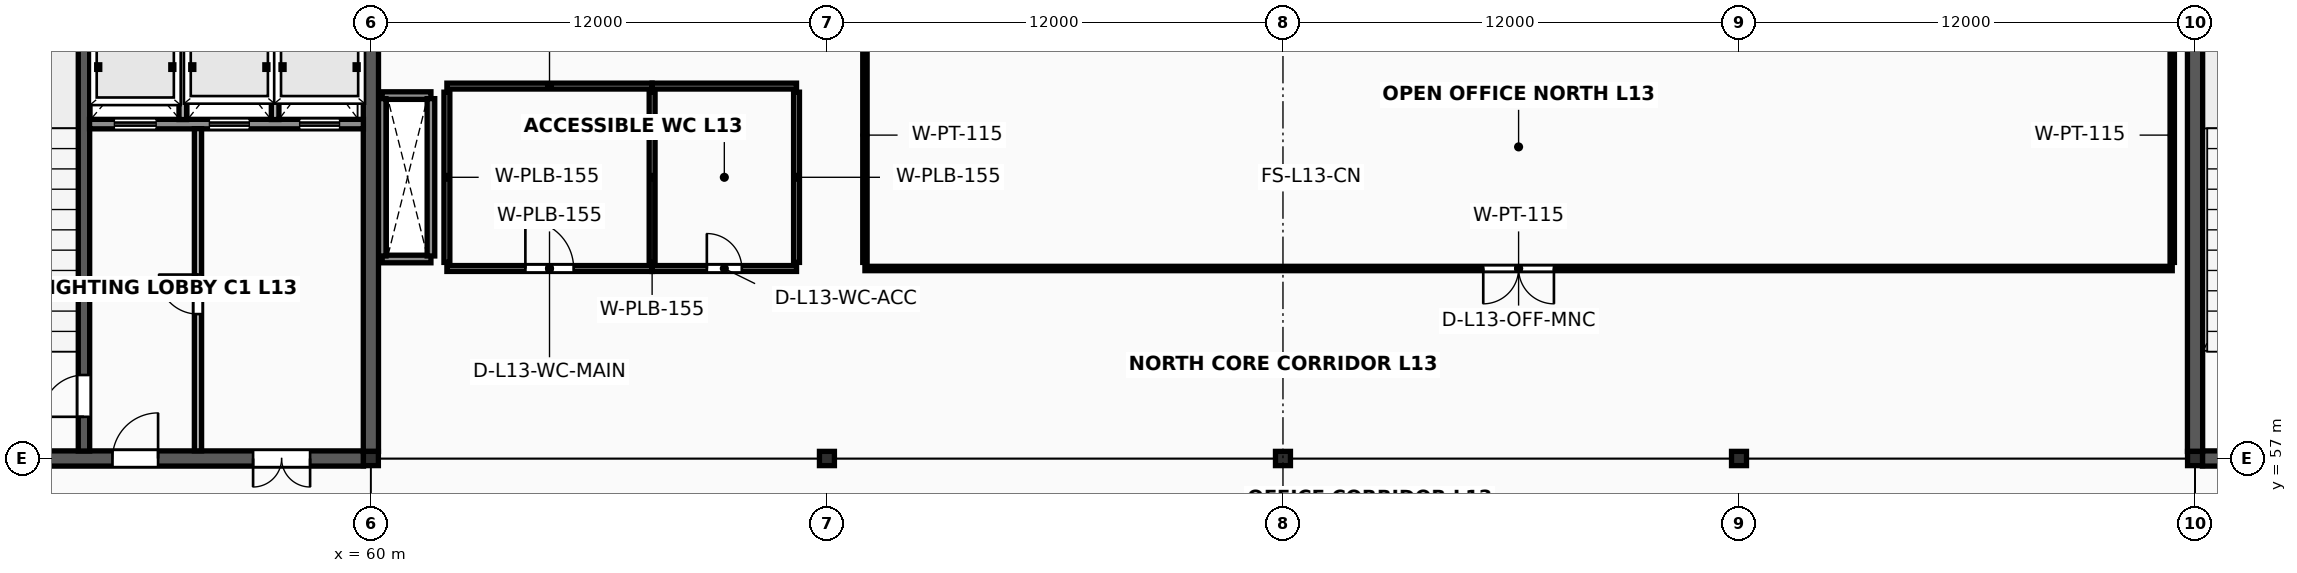
"""IFC4 building model, lengths in metres.
Left out: names, types, materials, properties, quantities, classifications, styles, units other than length and angle.
Written with IfcOpenShell. Run it as: python <this file> out.ifc"""

import sys

from ifc_helpers import new_model, si_unit, direction, frame, frame_2d, origin, origin_2d, place, context, subcontext, project, spatial, rectangle, i_section, extrude, element, fill, save


model = new_model("IFC4")
c1 = context("Model", 3, precision=1e-05, world=origin(), true_north=direction((0.0, 1.0)))
c2 = subcontext(c1, "Body", "Model", "MODEL_VIEW")
j1 = project(units=[si_unit("LENGTHUNIT", "METRE"), si_unit("PLANEANGLEUNIT", "RADIAN")], contexts=[c1])
p1 = place(None, origin())
s1 = spatial("IfcSite", under=j1, at=p1, CompositionType="ELEMENT")
p2 = place(p1, origin())
s2 = spatial("IfcBuilding", under=s1, at=p2, CompositionType="ELEMENT")
p3 = place(p2, frame((0.0, 0.0, 53.6)))
s3 = spatial("IfcBuildingStorey", under=s2, at=p3, CompositionType="ELEMENT", Elevation=53.6)
for number, where, z_axis, x_axis in (
    (1, (60.0, 57.0, 0.0), (0.0, 0.0, 1.0), (1.0, 0.0, 0.0)),
    (2, (72.0, 57.0, 0.0), (0.0, 0.0, 1.0), (1.0, 0.0, 0.0)),
    (3, (84.0, 57.0, 0.0), (0.0, 0.0, 1.0), (1.0, 0.0, 0.0)),
    (4, (96.0, 57.0, 0.0), (0.0, 0.0, 1.0), (1.0, 0.0, 0.0)),
    (5, (108.0, 57.0, 0.0), (0.0, 0.0, 1.0), (1.0, 0.0, 0.0)),
):
    element("IfcColumn", number, at=place(p3, frame(where, z_axis=z_axis, x_axis=x_axis)), inside=s3, PredefinedType="COLUMN", context=c2, shape_type="SweptSolid", body=[
        extrude(i_section(OverallWidth=0.394, OverallDepth=0.375, WebThickness=0.017, FlangeThickness=0.028, FilletRadius=0.018, at=origin_2d()), origin(), (0.0, 0.0, 1.0), 4.0),
    ])
for number, where, z_axis, x_axis in (
    (6, (60.297, 62.25, 0.0), (0.0, 0.0, 1.0), (1.0, 0.0, 0.0)),
    (7, (60.297, 66.55, 0.0), (0.0, 0.0, 1.0), (1.0, 0.0, 0.0)),
):
    element("IfcWall", number, at=place(p3, frame(where, z_axis=z_axis, x_axis=x_axis)), inside=s3, PredefinedType="SOLIDWALL", context=c2, shape_type="SweptSolid", body=[
        extrude(rectangle(XDim=1.283, YDim=0.2, at=frame_2d((0.642, 0.0))), origin(), (0.0, 0.0, 1.0), 3.818),
    ])
for number, where, z_axis, x_axis in (
    (8, (60.297, 62.33, 0.0), (0.0, 0.0, 1.0), (0.0, 1.0, 0.0)),
    (9, (61.58, 62.33, 0.0), (0.0, 0.0, 1.0), (0.0, 1.0, 0.0)),
):
    element("IfcWall", number, at=place(p3, frame(where, z_axis=z_axis, x_axis=x_axis)), inside=s3, PredefinedType="SOLIDWALL", context=c2, shape_type="SweptSolid", body=[
        extrude(rectangle(XDim=4.14, YDim=0.2, at=frame_2d((2.07, 0.0))), origin(), (0.0, 0.0, 1.0), 3.818),
    ])
p4 = place(p3, frame((48.194, 57.0, 0.0), z_axis=(0.0, 0.0, 1.0), x_axis=(1.0, 0.0, 0.0)))
e10 = element("IfcWall", 10, at=p4, inside=s3, PredefinedType="SHEAR", context=c2, shape_type="SweptSolid", body=[
    extrude(rectangle(XDim=11.612, YDim=0.4, at=frame_2d((5.806, 0.0))), origin(), (0.0, 0.0, 1.0), 3.818),
])
p5 = place(p4, frame((5.006, 0.0, 0.0)))
e11 = element("IfcOpeningElement", 11, at=p5, cuts=e10, PredefinedType="OPENING", context=c2, shape_type="SweptSolid", body=[
    extrude(rectangle(XDim=1.2, YDim=2.2, at=frame_2d((0.6, 1.1))), frame((0.0, 0.215, 0.0), z_axis=(0.0, -1.0, 0.0), x_axis=(1.0, 0.0, 0.0)), (0.0, 0.0, 1.0), 0.43),
])
p6 = place(p4, frame((8.706, 0.0, 0.0)))
e12 = element("IfcOpeningElement", 12, at=p6, cuts=e10, PredefinedType="OPENING", context=c2, shape_type="SweptSolid", body=[
    extrude(rectangle(XDim=1.5, YDim=2.25, at=frame_2d((0.75, 1.125))), frame((0.0, 0.215, 0.0), z_axis=(0.0, -1.0, 0.0), x_axis=(1.0, 0.0, 0.0)), (0.0, 0.0, 1.0), 0.43),
])
p7 = place(p3, frame((60.0, 57.185, 0.0), z_axis=(0.0, 0.0, 1.0), x_axis=(0.0, 1.0, 0.0)))
e13 = element("IfcWall", 13, at=p7, inside=s3, PredefinedType="SHEAR", context=c2, shape_type="SweptSolid", body=[
    extrude(rectangle(XDim=11.64, YDim=0.4, at=frame_2d((5.82, 0.0))), origin(), (0.0, 0.0, 1.0), 3.818),
])
p8 = place(p3, frame((52.45, 57.197, 0.0), z_axis=(0.0, 0.0, 1.0), x_axis=(0.0, 1.0, 0.0)))
e14 = element("IfcWall", 14, at=p8, inside=s3, PredefinedType="SHEAR", context=c2, shape_type="SweptSolid", body=[
    extrude(rectangle(XDim=11.606, YDim=0.3, at=frame_2d((5.803, 0.0))), origin(), (0.0, 0.0, 1.0), 3.818),
])
p9 = place(p8, frame((0.9, 0.0, 0.0)))
e15 = element("IfcOpeningElement", 15, at=p9, cuts=e14, PredefinedType="OPENING", context=c2, shape_type="SweptSolid", body=[
    extrude(rectangle(XDim=1.1, YDim=2.2, at=frame_2d((0.55, 1.1))), frame((0.0, 0.165, 0.0), z_axis=(0.0, -1.0, 0.0), x_axis=(1.0, 0.0, 0.0)), (0.0, 0.0, 1.0), 0.33),
])
p10 = place(p3, frame((52.597, 65.8, 0.0), z_axis=(0.0, 0.0, 1.0), x_axis=(1.0, 0.0, 0.0)))
e16 = element("IfcWall", 16, at=p10, inside=s3, PredefinedType="SOLIDWALL", context=c2, shape_type="SweptSolid", body=[
    extrude(rectangle(XDim=7.206, YDim=0.25, at=frame_2d((3.603, 0.0))), origin(), (0.0, 0.0, 1.0), 3.818),
])
p11 = place(p10, frame((0.653, 0.0, 0.0)))
e17 = element("IfcOpeningElement", 17, at=p11, cuts=e16, PredefinedType="OPENING", context=c2, shape_type="SweptSolid", body=[
    extrude(rectangle(XDim=1.1, YDim=2.24, at=frame_2d((0.55, 1.12))), frame((0.0, 0.14, 0.0), z_axis=(0.0, -1.0, 0.0), x_axis=(1.0, 0.0, 0.0)), (0.0, 0.0, 1.0), 0.28),
])
p12 = place(p10, frame((3.153, 0.0, 0.0)))
e18 = element("IfcOpeningElement", 18, at=p12, cuts=e16, PredefinedType="OPENING", context=c2, shape_type="SweptSolid", body=[
    extrude(rectangle(XDim=1.05, YDim=2.2, at=frame_2d((0.525, 1.1))), frame((0.0, 0.14, 0.0), z_axis=(0.0, -1.0, 0.0), x_axis=(1.0, 0.0, 0.0)), (0.0, 0.0, 1.0), 0.28),
])
p13 = place(p10, frame((5.528, 0.0, 0.0)))
e19 = element("IfcOpeningElement", 19, at=p13, cuts=e16, PredefinedType="OPENING", context=c2, shape_type="SweptSolid", body=[
    extrude(rectangle(XDim=1.05, YDim=2.2, at=frame_2d((0.525, 1.1))), frame((0.0, 0.14, 0.0), z_axis=(0.0, -1.0, 0.0), x_axis=(1.0, 0.0, 0.0)), (0.0, 0.0, 1.0), 0.28),
])
for number, where, z_axis, x_axis in (
    (20, (55.05, 65.92, 0.0), (0.0, 0.0, 1.0), (0.0, 1.0, 0.0)),
    (21, (57.48, 65.92, 0.0), (0.0, 0.0, 1.0), (0.0, 1.0, 0.0)),
):
    element("IfcWall", number, at=place(p3, frame(where, z_axis=z_axis, x_axis=x_axis)), inside=s3, PredefinedType="SOLIDWALL", context=c2, shape_type="SweptSolid", body=[
        extrude(rectangle(XDim=2.88, YDim=0.2, at=frame_2d((1.44, 0.0))), origin(), (0.0, 0.0, 1.0), 3.808),
    ])
p14 = place(p3, frame((55.45, 57.2, 0.0), z_axis=(0.0, 0.0, 1.0), x_axis=(0.0, 1.0, 0.0)))
e22 = element("IfcWall", 22, at=p14, inside=s3, PredefinedType="SOLIDWALL", context=c2, shape_type="SweptSolid", body=[
    extrude(rectangle(XDim=8.48, YDim=0.19, at=frame_2d((4.24, 0.0))), origin(), (0.0, 0.0, 1.0), 3.808),
])
p15 = place(p14, frame((3.6, 0.0, 0.0)))
e23 = element("IfcOpeningElement", 23, at=p15, cuts=e22, PredefinedType="OPENING", context=c2, shape_type="SweptSolid", body=[
    extrude(rectangle(XDim=1.04, YDim=2.18, at=frame_2d((0.52, 1.09))), frame((0.0, 0.11, 0.0), z_axis=(0.0, -1.0, 0.0), x_axis=(1.0, 0.0, 0.0)), (0.0, 0.0, 1.0), 0.22),
])
p16 = place(p3, frame((108.194, 57.0, 0.0), z_axis=(0.0, 0.0, 1.0), x_axis=(1.0, 0.0, 0.0)))
e24 = element("IfcWall", 24, at=p16, inside=s3, PredefinedType="SHEAR", context=c2, shape_type="SweptSolid", body=[
    extrude(rectangle(XDim=11.612, YDim=0.4, at=frame_2d((5.806, 0.0))), origin(), (0.0, 0.0, 1.0), 3.818),
])
p17 = place(p16, frame((5.006, 0.0, 0.0)))
e25 = element("IfcOpeningElement", 25, at=p17, cuts=e24, PredefinedType="OPENING", context=c2, shape_type="SweptSolid", body=[
    extrude(rectangle(XDim=1.2, YDim=2.2, at=frame_2d((0.6, 1.1))), frame((0.0, 0.215, 0.0), z_axis=(0.0, -1.0, 0.0), x_axis=(1.0, 0.0, 0.0)), (0.0, 0.0, 1.0), 0.43),
])
p18 = place(p16, frame((8.706, 0.0, 0.0)))
e26 = element("IfcOpeningElement", 26, at=p18, cuts=e24, PredefinedType="OPENING", context=c2, shape_type="SweptSolid", body=[
    extrude(rectangle(XDim=1.5, YDim=2.25, at=frame_2d((0.75, 1.125))), frame((0.0, 0.215, 0.0), z_axis=(0.0, -1.0, 0.0), x_axis=(1.0, 0.0, 0.0)), (0.0, 0.0, 1.0), 0.43),
])
p19 = place(p3, frame((108.0, 57.185, 0.0), z_axis=(0.0, 0.0, 1.0), x_axis=(0.0, 1.0, 0.0)))
e27 = element("IfcWall", 27, at=p19, inside=s3, PredefinedType="SHEAR", context=c2, shape_type="SweptSolid", body=[
    extrude(rectangle(XDim=11.64, YDim=0.4, at=frame_2d((5.82, 0.0))), origin(), (0.0, 0.0, 1.0), 3.818),
])
p20 = place(p3, frame((62.0, 62.0, 0.0), z_axis=(0.0, 0.0, 1.0), x_axis=(1.0, 0.0, 0.0)))
e28 = element("IfcWall", 28, at=p20, inside=s3, PredefinedType="PLUMBINGWALL", context=c2, shape_type="SweptSolid", body=[
    extrude(rectangle(XDim=5.4, YDim=0.155, at=frame_2d((2.7, 0.0))), origin(), (0.0, 0.0, 1.0), 2.88),
])
p21 = place(p20, frame((2.065, 0.0, 0.0)))
e29 = element("IfcOpeningElement", 29, at=p21, cuts=e28, PredefinedType="OPENING", context=c2, shape_type="SweptSolid", body=[
    extrude(rectangle(XDim=1.27, YDim=2.27, at=frame_2d((0.635, 1.135))), frame((0.0, 0.093, 0.0), z_axis=(0.0, -1.0, 0.0), x_axis=(1.0, 0.0, 0.0)), (0.0, 0.0, 1.0), 0.185),
])
p22 = place(p3, frame((62.0, 66.8, 0.0), z_axis=(0.0, 0.0, 1.0), x_axis=(1.0, 0.0, 0.0)))
e30 = element("IfcWall", 30, at=p22, inside=s3, PredefinedType="PLUMBINGWALL", context=c2, shape_type="SweptSolid", body=[
    extrude(rectangle(XDim=5.4, YDim=0.155, at=frame_2d((2.7, 0.0))), origin(), (0.0, 0.0, 1.0), 2.88),
])
for number, where, z_axis, x_axis in (
    (31, (62.0, 62.16, 0.0), (0.0, 0.0, 1.0), (0.0, 1.0, 0.0)),
    (32, (67.4, 62.16, 0.0), (0.0, 0.0, 1.0), (0.0, 1.0, 0.0)),
):
    element("IfcWall", number, at=place(p3, frame(where, z_axis=z_axis, x_axis=x_axis)), inside=s3, PredefinedType="PLUMBINGWALL", context=c2, shape_type="SweptSolid", body=[
        extrude(rectangle(XDim=4.48, YDim=0.155, at=frame_2d((2.24, 0.0))), origin(), (0.0, 0.0, 1.0), 2.88),
    ])
p23 = place(p3, frame((67.4, 62.0, 0.0), z_axis=(0.0, 0.0, 1.0), x_axis=(1.0, 0.0, 0.0)))
e33 = element("IfcWall", 33, at=p23, inside=s3, PredefinedType="PLUMBINGWALL", context=c2, shape_type="SweptSolid", body=[
    extrude(rectangle(XDim=3.8, YDim=0.155, at=frame_2d((1.9, 0.0))), origin(), (0.0, 0.0, 1.0), 2.88),
])
p24 = place(p23, frame((1.44, 0.0, 0.0)))
e34 = element("IfcOpeningElement", 34, at=p24, cuts=e33, PredefinedType="OPENING", context=c2, shape_type="SweptSolid", body=[
    extrude(rectangle(XDim=0.92, YDim=2.1, at=frame_2d((0.46, 1.05))), frame((0.0, 0.093, 0.0), z_axis=(0.0, -1.0, 0.0), x_axis=(1.0, 0.0, 0.0)), (0.0, 0.0, 1.0), 0.185),
])
p25 = place(p3, frame((67.4, 66.8, 0.0), z_axis=(0.0, 0.0, 1.0), x_axis=(1.0, 0.0, 0.0)))
e35 = element("IfcWall", 35, at=p25, inside=s3, PredefinedType="PLUMBINGWALL", context=c2, shape_type="SweptSolid", body=[
    extrude(rectangle(XDim=3.8, YDim=0.155, at=frame_2d((1.9, 0.0))), origin(), (0.0, 0.0, 1.0), 2.88),
])
p26 = place(p3, frame((71.2, 62.16, 0.0), z_axis=(0.0, 0.0, 1.0), x_axis=(0.0, 1.0, 0.0)))
e36 = element("IfcWall", 36, at=p26, inside=s3, PredefinedType="PLUMBINGWALL", context=c2, shape_type="SweptSolid", body=[
    extrude(rectangle(XDim=4.48, YDim=0.155, at=frame_2d((2.24, 0.0))), origin(), (0.0, 0.0, 1.0), 2.88),
])
p27 = place(p3, frame((73.0, 62.0, 0.0), z_axis=(0.0, 0.0, 1.0), x_axis=(1.0, 0.0, 0.0)))
e37 = element("IfcWall", 37, at=p27, inside=s3, PredefinedType="PARTITIONING", context=c2, shape_type="SweptSolid", body=[
    extrude(rectangle(XDim=34.4, YDim=0.115, at=frame_2d((17.2, 0.0))), origin(), (0.0, 0.0, 1.0), 2.88),
])
p28 = place(p27, frame((16.27, 0.0, 0.0)))
e38 = element("IfcOpeningElement", 38, at=p28, cuts=e37, PredefinedType="OPENING", context=c2, shape_type="SweptSolid", body=[
    extrude(rectangle(XDim=1.86, YDim=2.41, at=frame_2d((0.93, 1.205))), frame((0.0, 0.073, 0.0), z_axis=(0.0, -1.0, 0.0), x_axis=(1.0, 0.0, 0.0)), (0.0, 0.0, 1.0), 0.145),
])
for number, where, z_axis, x_axis in (
    (39, (73.0, 62.16, 0.0), (0.0, 0.0, 1.0), (0.0, 1.0, 0.0)),
    (40, (107.4, 62.16, 0.0), (0.0, 0.0, 1.0), (0.0, 1.0, 0.0)),
):
    element("IfcWall", number, at=place(p3, frame(where, z_axis=z_axis, x_axis=x_axis)), inside=s3, PredefinedType="PARTITIONING", context=c2, shape_type="SweptSolid", body=[
        extrude(rectangle(XDim=6.7, YDim=0.115, at=frame_2d((3.35, 0.0))), origin(), (0.0, 0.0, 1.0), 2.88),
    ])
p29 = place(p9, origin())
e41 = element("IfcDoor", 41, at=p29, inside=s3, OperationType="SINGLE_SWING_LEFT", PredefinedType="DOOR", context=c2, shape_type="SweptSolid", body=[
    extrude(rectangle(XDim=1.1, YDim=2.2, at=frame_2d((0.55, 1.1))), frame((0.0, 0.025, 0.0), z_axis=(0.0, -1.0, 0.0), x_axis=(1.0, 0.0, 0.0)), (0.0, 0.0, 1.0), 0.05),
])
fill(e15, e41)
p30 = place(p15, origin())
e42 = element("IfcDoor", 42, at=p30, inside=s3, OperationType="SINGLE_SWING_RIGHT", PredefinedType="DOOR", context=c2, shape_type="SweptSolid", body=[
    extrude(rectangle(XDim=1.04, YDim=2.18, at=frame_2d((0.52, 1.09))), frame((0.0, 0.025, 0.0), z_axis=(0.0, -1.0, 0.0), x_axis=(1.0, 0.0, 0.0)), (0.0, 0.0, 1.0), 0.05),
])
fill(e23, e42)
p31 = place(p5, origin())
e43 = element("IfcDoor", 43, at=p31, inside=s3, OperationType="SINGLE_SWING_RIGHT", PredefinedType="DOOR", context=c2, shape_type="SweptSolid", body=[
    extrude(rectangle(XDim=1.2, YDim=2.2, at=frame_2d((0.6, 1.1))), frame((0.0, 0.025, 0.0), z_axis=(0.0, -1.0, 0.0), x_axis=(1.0, 0.0, 0.0)), (0.0, 0.0, 1.0), 0.05),
])
fill(e11, e43)
p32 = place(p6, origin())
e44 = element("IfcDoor", 44, at=p32, inside=s3, OperationType="DOUBLE_DOOR_SINGLE_SWING", PredefinedType="DOOR", context=c2, shape_type="SweptSolid", body=[
    extrude(rectangle(XDim=1.5, YDim=2.25, at=frame_2d((0.75, 1.125))), frame((0.0, 0.025, 0.0), z_axis=(0.0, -1.0, 0.0), x_axis=(1.0, 0.0, 0.0)), (0.0, 0.0, 1.0), 0.05),
])
fill(e12, e44)
p33 = place(p11, origin())
e45 = element("IfcDoor", 45, at=p33, inside=s3, OperationType="SLIDING_TO_LEFT", PredefinedType="USERDEFINED", context=c2, shape_type="SweptSolid", body=[
    extrude(rectangle(XDim=1.1, YDim=2.24, at=frame_2d((0.55, 1.12))), frame((0.0, 0.025, 0.0), z_axis=(0.0, -1.0, 0.0), x_axis=(1.0, 0.0, 0.0)), (0.0, 0.0, 1.0), 0.05),
])
fill(e17, e45)
p34 = place(p12, origin())
e46 = element("IfcDoor", 46, at=p34, inside=s3, OperationType="SLIDING_TO_LEFT", PredefinedType="USERDEFINED", context=c2, shape_type="SweptSolid", body=[
    extrude(rectangle(XDim=1.05, YDim=2.2, at=frame_2d((0.525, 1.1))), frame((0.0, 0.025, 0.0), z_axis=(0.0, -1.0, 0.0), x_axis=(1.0, 0.0, 0.0)), (0.0, 0.0, 1.0), 0.05),
])
fill(e18, e46)
p35 = place(p13, origin())
e47 = element("IfcDoor", 47, at=p35, inside=s3, OperationType="SLIDING_TO_LEFT", PredefinedType="USERDEFINED", context=c2, shape_type="SweptSolid", body=[
    extrude(rectangle(XDim=1.05, YDim=2.2, at=frame_2d((0.525, 1.1))), frame((0.0, 0.025, 0.0), z_axis=(0.0, -1.0, 0.0), x_axis=(1.0, 0.0, 0.0)), (0.0, 0.0, 1.0), 0.05),
])
fill(e19, e47)
p36 = place(p21, origin())
e48 = element("IfcDoor", 48, at=p36, inside=s3, OperationType="SINGLE_SWING_LEFT", PredefinedType="DOOR", context=c2, shape_type="SweptSolid", body=[
    extrude(rectangle(XDim=1.27, YDim=2.27, at=frame_2d((0.635, 1.135))), frame((0.0, 0.025, 0.0), z_axis=(0.0, -1.0, 0.0), x_axis=(1.0, 0.0, 0.0)), (0.0, 0.0, 1.0), 0.05),
])
fill(e29, e48)
p37 = place(p24, origin())
e49 = element("IfcDoor", 49, at=p37, inside=s3, OperationType="SINGLE_SWING_LEFT", PredefinedType="DOOR", context=c2, shape_type="SweptSolid", body=[
    extrude(rectangle(XDim=0.92, YDim=2.1, at=frame_2d((0.46, 1.05))), frame((0.0, 0.025, 0.0), z_axis=(0.0, -1.0, 0.0), x_axis=(1.0, 0.0, 0.0)), (0.0, 0.0, 1.0), 0.05),
])
fill(e34, e49)
p38 = place(p28, origin())
e50 = element("IfcDoor", 50, at=p38, inside=s3, OperationType="DOUBLE_DOOR_SINGLE_SWING", PredefinedType="DOOR", context=c2, shape_type="SweptSolid", body=[
    extrude(rectangle(XDim=1.86, YDim=2.41, at=frame_2d((0.93, 1.205))), frame((0.0, 0.025, 0.0), z_axis=(0.0, -1.0, 0.0), x_axis=(1.0, 0.0, 0.0)), (0.0, 0.0, 1.0), 0.05),
])
fill(e38, e50)
save(model, sys.argv[1])
